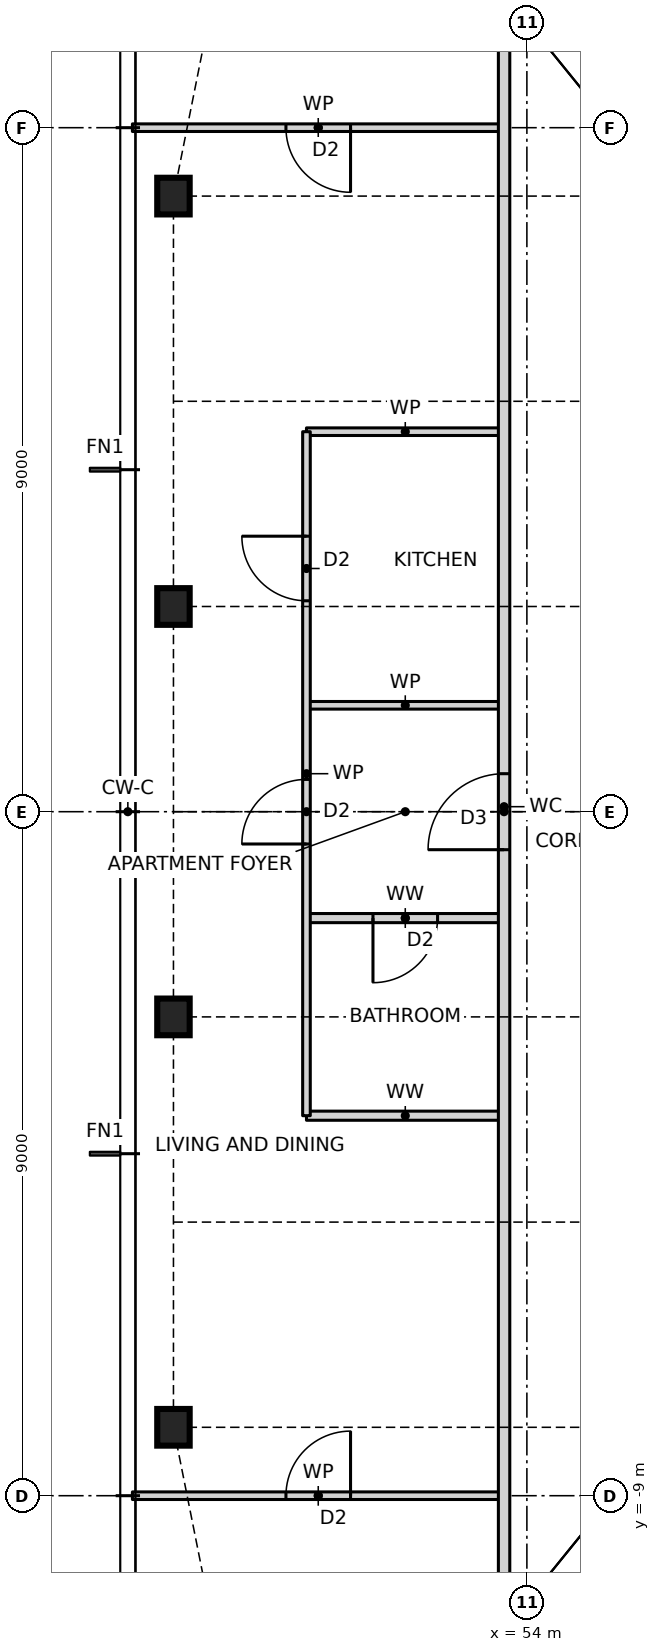
"""IFC4 building model, lengths in metres.
Left out: names, types, materials, properties, quantities, classifications, styles, units other than length and angle.
Written with IfcOpenShell. Run it as: python <this file> out.ifc"""

import sys

from ifc_helpers import new_model, si_unit, direction, frame, frame_2d, origin, origin_2d, place, context, subcontext, project, spatial, rectangle, i_section, extrude, element, fill, save


model = new_model("IFC4")
c1 = context("Model", 3, precision=1e-05, world=origin(), true_north=direction((0.0, 1.0)))
c2 = subcontext(c1, "Body", "Model", "MODEL_VIEW")
j1 = project(units=[si_unit("LENGTHUNIT", "METRE"), si_unit("PLANEANGLEUNIT", "RADIAN")], contexts=[c1])
p1 = place(None, origin())
s1 = spatial("IfcSite", under=j1, at=p1, CompositionType="ELEMENT")
p2 = place(p1, origin())
s2 = spatial("IfcBuilding", under=s1, at=p2, CompositionType="ELEMENT")
p3 = place(p2, frame((0.0, 0.0, 108.5)))
s3 = spatial("IfcBuildingStorey", under=s2, at=p3, CompositionType="ELEMENT", Elevation=108.5)
for number, where, z_axis, x_axis in (
    (1, (49.35, 8.1, 0.0), (0.0, 0.0, 1.0), (1.0, 0.0, 0.0)),
    (2, (49.35, 2.7, 0.0), (0.0, 0.0, 1.0), (1.0, 0.0, 0.0)),
    (3, (49.35, -2.7, 0.0), (0.0, 0.0, 1.0), (1.0, 0.0, 0.0)),
    (4, (49.35, -8.1, 0.0), (0.0, 0.0, 1.0), (1.0, 0.0, 0.0)),
):
    element("IfcColumn", number, at=place(p3, frame(where, z_axis=z_axis, x_axis=x_axis)), inside=s3, PredefinedType="COLUMN", context=c2, shape_type="SweptSolid", body=[
        extrude(i_section(OverallWidth=0.427, OverallDepth=0.483, WebThickness=0.051, FlangeThickness=0.082, at=origin_2d()), origin(), (0.0, 0.0, 1.0), 3.5),
    ])
p4 = place(p3, frame((48.81, -9.0, 0.0), z_axis=(0.0, 0.0, 1.0), x_axis=(1.0, 0.0, 0.0)))
e5 = element("IfcWall", 5, at=p4, inside=s3, PredefinedType="PARTITIONING", context=c2, shape_type="SweptSolid", body=[
    extrude(rectangle(XDim=4.89, YDim=0.1, at=frame_2d((2.445, 0.0))), origin(), (0.0, 0.0, 1.0), 3.27),
])
p5 = place(p4, frame((2.02, 0.0, 0.0)))
e6 = element("IfcOpeningElement", 6, at=p5, cuts=e5, PredefinedType="OPENING", context=c2, shape_type="SweptSolid", body=[
    extrude(rectangle(XDim=0.85, YDim=2.1, at=frame_2d((0.425, 1.05))), frame((0.0, 0.06, 0.0), z_axis=(0.0, -1.0, 0.0), x_axis=(1.0, 0.0, 0.0)), (0.0, 0.0, 1.0), 0.12),
])
p6 = place(p3, frame((51.1, -4.0, 0.0), z_axis=(0.0, 0.0, 1.0), x_axis=(1.0, 0.0, 0.0)))
e7 = element("IfcWall", 7, at=p6, inside=s3, PredefinedType="PARTITIONING", context=c2, shape_type="SweptSolid", body=[
    extrude(rectangle(XDim=2.6, YDim=0.12, at=frame_2d((1.3, 0.0))), origin(), (0.0, 0.0, 1.0), 3.27),
])
p7 = place(p3, frame((51.1, -1.4, 0.0), z_axis=(0.0, 0.0, 1.0), x_axis=(1.0, 0.0, 0.0)))
e8 = element("IfcWall", 8, at=p7, inside=s3, PredefinedType="PARTITIONING", context=c2, shape_type="SweptSolid", body=[
    extrude(rectangle(XDim=2.6, YDim=0.12, at=frame_2d((1.3, 0.0))), origin(), (0.0, 0.0, 1.0), 3.27),
])
p8 = place(p7, frame((0.875, 0.0, 0.0)))
e9 = element("IfcOpeningElement", 9, at=p8, cuts=e8, PredefinedType="OPENING", context=c2, shape_type="SweptSolid", body=[
    extrude(rectangle(XDim=0.85, YDim=2.1, at=frame_2d((0.425, 1.05))), frame((0.0, 0.07, 0.0), z_axis=(0.0, -1.0, 0.0), x_axis=(1.0, 0.0, 0.0)), (0.0, 0.0, 1.0), 0.14),
])
for number, where, z_axis, x_axis in (
    (10, (51.1, 1.4, 0.0), (0.0, 0.0, 1.0), (1.0, 0.0, 0.0)),
    (11, (51.1, 5.0, 0.0), (0.0, 0.0, 1.0), (1.0, 0.0, 0.0)),
):
    element("IfcWall", number, at=place(p3, frame(where, z_axis=z_axis, x_axis=x_axis)), inside=s3, PredefinedType="PARTITIONING", context=c2, shape_type="SweptSolid", body=[
        extrude(rectangle(XDim=2.6, YDim=0.1, at=frame_2d((1.3, 0.0))), origin(), (0.0, 0.0, 1.0), 3.27),
    ])
p9 = place(p3, frame((48.81, 9.0, 0.0), z_axis=(0.0, 0.0, 1.0), x_axis=(1.0, 0.0, 0.0)))
e12 = element("IfcWall", 12, at=p9, inside=s3, PredefinedType="PARTITIONING", context=c2, shape_type="SweptSolid", body=[
    extrude(rectangle(XDim=4.89, YDim=0.1, at=frame_2d((2.445, 0.0))), origin(), (0.0, 0.0, 1.0), 3.27),
])
p10 = place(p9, frame((2.02, 0.0, 0.0)))
e13 = element("IfcOpeningElement", 13, at=p10, cuts=e12, PredefinedType="OPENING", context=c2, shape_type="SweptSolid", body=[
    extrude(rectangle(XDim=0.85, YDim=2.1, at=frame_2d((0.425, 1.05))), frame((0.0, 0.06, 0.0), z_axis=(0.0, -1.0, 0.0), x_axis=(1.0, 0.0, 0.0)), (0.0, 0.0, 1.0), 0.12),
])
p11 = place(p3, frame((53.7, -10.768, 0.0), z_axis=(0.0, 0.0, 1.0), x_axis=(0.0, 1.0, 0.0)))
e14 = element("IfcWall", 14, at=p11, inside=s3, PredefinedType="PARTITIONING", context=c2, shape_type="SweptSolid", body=[
    extrude(rectangle(XDim=21.668, YDim=0.15, at=frame_2d((10.834, 0.0))), origin(), (0.0, 0.0, 1.0), 3.27),
])
p12 = place(p11, frame((10.268, 0.0, 0.0)))
e15 = element("IfcOpeningElement", 15, at=p12, cuts=e14, PredefinedType="OPENING", context=c2, shape_type="SweptSolid", body=[
    extrude(rectangle(XDim=1.0, YDim=2.1, at=frame_2d((0.5, 1.05))), frame((0.0, 0.085, 0.0), z_axis=(0.0, -1.0, 0.0), x_axis=(1.0, 0.0, 0.0)), (0.0, 0.0, 1.0), 0.17),
])
p13 = place(p3, frame((51.1, -4.0, 0.0), z_axis=(0.0, 0.0, 1.0), x_axis=(0.0, 1.0, 0.0)))
e16 = element("IfcWall", 16, at=p13, inside=s3, PredefinedType="PARTITIONING", context=c2, shape_type="SweptSolid", body=[
    extrude(rectangle(XDim=9.0, YDim=0.1, at=frame_2d((4.5, 0.0))), origin(), (0.0, 0.0, 1.0), 3.27),
])
p14 = place(p13, frame((6.775, 0.0, 0.0)))
e17 = element("IfcOpeningElement", 17, at=p14, cuts=e16, PredefinedType="OPENING", context=c2, shape_type="SweptSolid", body=[
    extrude(rectangle(XDim=0.85, YDim=2.1, at=frame_2d((0.425, 1.05))), frame((0.0, 0.06, 0.0), z_axis=(0.0, -1.0, 0.0), x_axis=(1.0, 0.0, 0.0)), (0.0, 0.0, 1.0), 0.12),
])
p15 = place(p13, frame((3.575, 0.0, 0.0)))
e18 = element("IfcOpeningElement", 18, at=p15, cuts=e16, PredefinedType="OPENING", context=c2, shape_type="SweptSolid", body=[
    extrude(rectangle(XDim=0.85, YDim=2.1, at=frame_2d((0.425, 1.05))), frame((0.0, 0.06, 0.0), z_axis=(0.0, -1.0, 0.0), x_axis=(1.0, 0.0, 0.0)), (0.0, 0.0, 1.0), 0.12),
])
p16 = place(p14, origin())
e19 = element("IfcDoor", 19, at=p16, inside=s3, OperationType="SINGLE_SWING_RIGHT", PredefinedType="DOOR", context=c2, shape_type="SweptSolid", body=[
    extrude(rectangle(XDim=0.85, YDim=2.1, at=frame_2d((0.425, 1.05))), frame((0.0, 0.025, 0.0), z_axis=(0.0, -1.0, 0.0), x_axis=(1.0, 0.0, 0.0)), (0.0, 0.0, 1.0), 0.05),
])
fill(e17, e19)
p17 = place(p12, origin())
e20 = element("IfcDoor", 20, at=p17, inside=s3, OperationType="SINGLE_SWING_LEFT", PredefinedType="DOOR", context=c2, shape_type="SweptSolid", body=[
    extrude(rectangle(XDim=1.0, YDim=2.1, at=frame_2d((0.5, 1.05))), frame((0.0, 0.025, 0.0), z_axis=(0.0, -1.0, 0.0), x_axis=(1.0, 0.0, 0.0)), (0.0, 0.0, 1.0), 0.05),
])
fill(e15, e20)
p18 = place(p15, origin())
e21 = element("IfcDoor", 21, at=p18, inside=s3, OperationType="SINGLE_SWING_LEFT", PredefinedType="DOOR", context=c2, shape_type="SweptSolid", body=[
    extrude(rectangle(XDim=0.85, YDim=2.1, at=frame_2d((0.425, 1.05))), frame((0.0, 0.025, 0.0), z_axis=(0.0, -1.0, 0.0), x_axis=(1.0, 0.0, 0.0)), (0.0, 0.0, 1.0), 0.05),
])
fill(e18, e21)
p19 = place(p8, frame((0.85, 0.0, 0.0), z_axis=(0.0, 0.0, 1.0), x_axis=(-1.0, 0.0, 0.0)))
e22 = element("IfcDoor", 22, at=p19, inside=s3, OperationType="SINGLE_SWING_RIGHT", PredefinedType="DOOR", context=c2, shape_type="SweptSolid", body=[
    extrude(rectangle(XDim=0.85, YDim=2.1, at=frame_2d((0.425, 1.05))), frame((0.0, 0.025, 0.0), z_axis=(0.0, -1.0, 0.0), x_axis=(1.0, 0.0, 0.0)), (0.0, 0.0, 1.0), 0.05),
])
fill(e9, e22)
p20 = place(p10, frame((0.85, 0.0, 0.0), z_axis=(0.0, 0.0, 1.0), x_axis=(-1.0, 0.0, 0.0)))
e23 = element("IfcDoor", 23, at=p20, inside=s3, OperationType="SINGLE_SWING_LEFT", PredefinedType="DOOR", context=c2, shape_type="SweptSolid", body=[
    extrude(rectangle(XDim=0.85, YDim=2.1, at=frame_2d((0.425, 1.05))), frame((0.0, 0.025, 0.0), z_axis=(0.0, -1.0, 0.0), x_axis=(1.0, 0.0, 0.0)), (0.0, 0.0, 1.0), 0.05),
])
fill(e13, e23)
p21 = place(p5, origin())
e24 = element("IfcDoor", 24, at=p21, inside=s3, OperationType="SINGLE_SWING_RIGHT", PredefinedType="DOOR", context=c2, shape_type="SweptSolid", body=[
    extrude(rectangle(XDim=0.85, YDim=2.1, at=frame_2d((0.425, 1.05))), frame((0.0, 0.025, 0.0), z_axis=(0.0, -1.0, 0.0), x_axis=(1.0, 0.0, 0.0)), (0.0, 0.0, 1.0), 0.05),
])
fill(e6, e24)
save(model, sys.argv[1])
